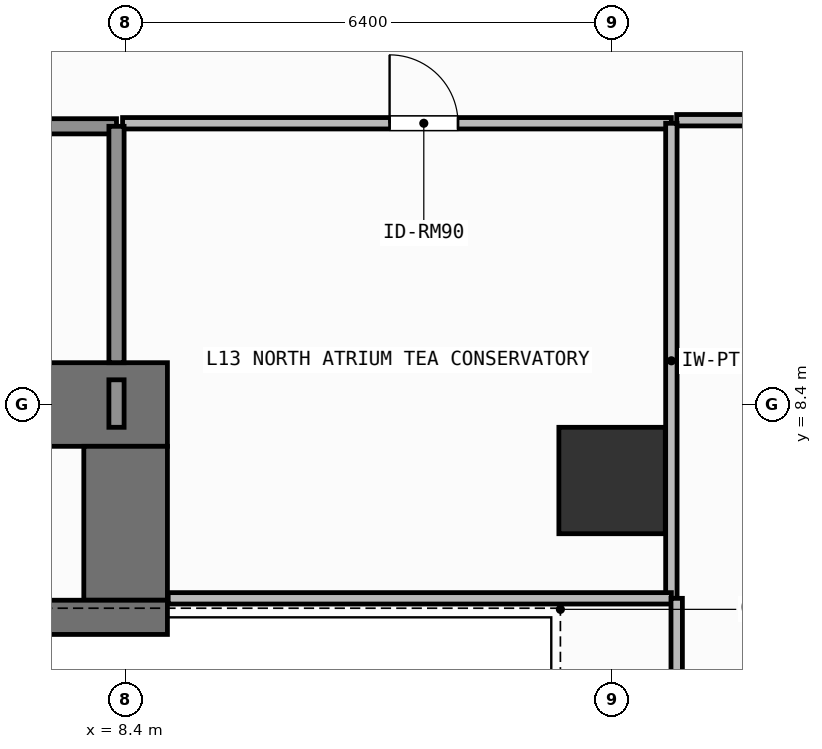
"""IFC4 building model, lengths in metres.
Left out: names, types, materials, properties, quantities, classifications, styles, units other than length and angle.
Written with IfcOpenShell. Run it as: python <this file> out.ifc"""

import sys

from ifc_helpers import new_model, si_unit, direction, frame, frame_2d, origin, origin_2d, place, context, subcontext, project, spatial, rectangle, extrude, element, fill, save


model = new_model("IFC4")
c1 = context("Model", 3, precision=1e-05, world=origin(), true_north=direction((0.0, 1.0)))
c2 = subcontext(c1, "Body", "Model", "MODEL_VIEW")
j1 = project(units=[si_unit("LENGTHUNIT", "METRE"), si_unit("PLANEANGLEUNIT", "RADIAN")], contexts=[c1])
p1 = place(None, origin())
s1 = spatial("IfcSite", under=j1, at=p1, CompositionType="ELEMENT")
p2 = place(p1, origin())
s2 = spatial("IfcBuilding", under=s1, at=p2, CompositionType="ELEMENT")
p3 = place(p2, frame((0.0, 0.0, 50.1)))
s3 = spatial("IfcBuildingStorey", under=s2, at=p3, CompositionType="ELEMENT", Elevation=50.1)
p4 = place(p3, frame((-7.55, 8.4, 0.0), z_axis=(0.0, 0.0, 1.0), x_axis=(1.0, 0.0, 0.0)))
e1 = element("IfcWall", 1, at=p4, inside=s3, PredefinedType="SHEAR", context=c2, shape_type="SweptSolid", body=[
    extrude(rectangle(XDim=16.5, YDim=1.1, at=frame_2d((8.25, 0.0))), origin(), (0.0, 0.0, 1.0), 3.9),
])
p5 = place(p3, frame((8.4, 5.825, 0.0), z_axis=(0.0, 0.0, 1.0), x_axis=(0.0, 1.0, 0.0)))
e2 = element("IfcWall", 2, at=p5, inside=s3, PredefinedType="SHEAR", context=c2, shape_type="SweptSolid", body=[
    extrude(rectangle(XDim=2.025, YDim=1.1, at=frame_2d((1.013, 0.0))), origin(), (0.0, 0.0, 1.0), 3.9),
])
p6 = place(p3, frame((3.045, 5.6, 0.0), z_axis=(0.0, 0.0, 1.0), x_axis=(1.0, 0.0, 0.0)))
e3 = element("IfcWall", 3, at=p6, inside=s3, PredefinedType="SHEAR", context=c2, shape_type="SweptSolid", body=[
    extrude(rectangle(XDim=5.905, YDim=0.45, at=frame_2d((2.953, 0.0))), origin(), (0.0, 0.0, 1.0), 3.9),
])
p7 = place(p3, frame((14.8, 7.4, 0.0), z_axis=(0.0, 0.0, 1.0), x_axis=(1.0, 0.0, 0.0)))
e4 = element("IfcColumn", 4, at=p7, inside=s3, PredefinedType="COLUMN", context=c2, shape_type="SweptSolid", body=[
    extrude(rectangle(XDim=1.4, YDim=1.4, at=origin_2d()), origin(), (0.0, 0.0, 1.0), 3.9),
])
p8 = place(p3, frame((4.58, 12.06, 0.0), z_axis=(0.0, 0.0, 1.0), x_axis=(1.0, 0.0, 0.0)))
e5 = element("IfcWall", 5, at=p8, inside=s3, PredefinedType="SOLIDWALL", context=c2, shape_type="SweptSolid", body=[
    extrude(rectangle(XDim=3.7, YDim=0.2, at=frame_2d((1.85, 0.0))), origin(), (0.0, 0.0, 1.0), 3.62),
])
p9 = place(p8, frame((1.212, 0.0, 0.0)))
e6 = element("IfcOpeningElement", 6, at=p9, cuts=e5, PredefinedType="OPENING", context=c2, shape_type="SweptSolid", body=[
    extrude(rectangle(XDim=1.1, YDim=2.15, at=frame_2d((0.55, 1.075))), frame((0.0, 0.11, 0.0), z_axis=(0.0, -1.0, 0.0), x_axis=(1.0, 0.0, 0.0)), (0.0, 0.0, 1.0), 0.22),
])
p10 = place(p3, frame((8.36, 12.1, 0.0), z_axis=(0.0, 0.0, 1.0), x_axis=(1.0, 0.0, 0.0)))
e7 = element("IfcWall", 7, at=p10, inside=s3, PredefinedType="PARTITIONING", context=c2, shape_type="SweptSolid", body=[
    extrude(rectangle(XDim=7.22, YDim=0.15, at=frame_2d((3.61, 0.0))), origin(), (0.0, 0.0, 1.0), 3.62),
])
p11 = place(p10, frame((3.513, 0.0, 0.0)))
e8 = element("IfcOpeningElement", 8, at=p11, cuts=e7, PredefinedType="OPENING", context=c2, shape_type="SweptSolid", body=[
    extrude(rectangle(XDim=0.9, YDim=2.1, at=frame_2d((0.45, 1.05))), frame((0.0, 0.085, 0.0), z_axis=(0.0, -1.0, 0.0), x_axis=(1.0, 0.0, 0.0)), (0.0, 0.0, 1.0), 0.17),
])
p12 = place(p3, frame((15.65, 12.14, 0.0), z_axis=(0.0, 0.0, 1.0), x_axis=(1.0, 0.0, 0.0)))
e9 = element("IfcWall", 9, at=p12, inside=s3, PredefinedType="PARTITIONING", context=c2, shape_type="SweptSolid", body=[
    extrude(rectangle(XDim=12.27, YDim=0.15, at=frame_2d((6.135, 0.0))), origin(), (0.0, 0.0, 1.0), 3.62),
])
p13 = place(p12, frame((5.15, 0.0, 0.0)))
e10 = element("IfcOpeningElement", 10, at=p13, cuts=e9, PredefinedType="OPENING", context=c2, shape_type="SweptSolid", body=[
    extrude(rectangle(XDim=0.9, YDim=2.1, at=frame_2d((0.45, 1.05))), frame((0.0, 0.085, 0.0), z_axis=(0.0, -1.0, 0.0), x_axis=(1.0, 0.0, 0.0)), (0.0, 0.0, 1.0), 0.17),
])
p14 = place(p3, frame((8.28, 8.95, 0.0), z_axis=(0.0, 0.0, 1.0), x_axis=(0.0, 1.0, 0.0)))
e11 = element("IfcWall", 11, at=p14, inside=s3, PredefinedType="SOLIDWALL", context=c2, shape_type="SweptSolid", body=[
    extrude(rectangle(XDim=3.11, YDim=0.2, at=frame_2d((1.555, 0.0))), origin(), (0.0, 0.0, 1.0), 3.62),
])
p15 = place(p3, frame((8.28, 8.1, 0.0), z_axis=(0.0, 0.0, 1.0), x_axis=(0.0, 1.0, 0.0)))
e12 = element("IfcWall", 12, at=p15, inside=s3, PredefinedType="SOLIDWALL", context=c2, shape_type="SweptSolid", body=[
    extrude(rectangle(XDim=0.625, YDim=0.2, at=frame_2d((0.312, 0.0))), origin(), (0.0, 0.0, 1.0), 3.62),
])
p16 = place(p3, frame((15.58, 5.85, 0.0), z_axis=(0.0, 0.0, 1.0), x_axis=(0.0, 1.0, 0.0)))
e13 = element("IfcWall", 13, at=p16, inside=s3, PredefinedType="PARTITIONING", context=c2, shape_type="SweptSolid", body=[
    extrude(rectangle(XDim=6.25, YDim=0.15, at=frame_2d((3.125, 0.0))), origin(), (0.0, 0.0, 1.0), 3.62),
])
p17 = place(p3, frame((8.96, 5.85, 0.0), z_axis=(0.0, 0.0, 1.0), x_axis=(1.0, 0.0, 0.0)))
e14 = element("IfcWall", 14, at=p17, inside=s3, PredefinedType="PARTITIONING", context=c2, shape_type="SweptSolid", body=[
    extrude(rectangle(XDim=6.62, YDim=0.15, at=frame_2d((3.31, 0.0))), origin(), (0.0, 0.0, 1.0), 3.62),
])
p18 = place(p3, frame((15.65, -2.75, 0.0), z_axis=(0.0, 0.0, 1.0), x_axis=(0.0, 1.0, 0.0)))
e15 = element("IfcWall", 15, at=p18, inside=s3, PredefinedType="PARTITIONING", context=c2, shape_type="SweptSolid", body=[
    extrude(rectangle(XDim=8.6, YDim=0.15, at=frame_2d((4.3, 0.0))), origin(), (0.0, 0.0, 1.0), 3.62),
])
p19 = place(p11, origin())
e16 = element("IfcDoor", 16, at=p19, inside=s3, OperationType="SINGLE_SWING_LEFT", PredefinedType="DOOR", context=c2, shape_type="SweptSolid", body=[
    extrude(rectangle(XDim=0.9, YDim=2.1, at=frame_2d((0.45, 1.05))), frame((0.0, 0.025, 0.0), z_axis=(0.0, -1.0, 0.0), x_axis=(1.0, 0.0, 0.0)), (0.0, 0.0, 1.0), 0.05),
])
fill(e8, e16)
save(model, sys.argv[1])
